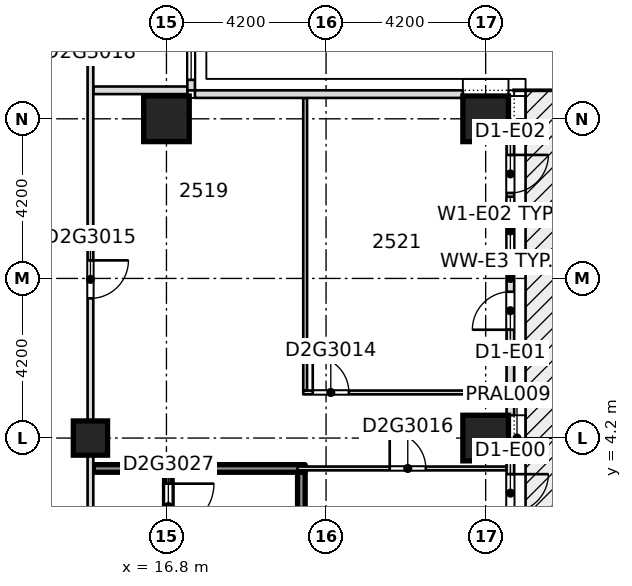
"""IFC4 building model, lengths in metres.
Left out: names, types, materials, properties, quantities, classifications, styles, units other than length and angle.
Written with IfcOpenShell. Run it as: python <this file> out.ifc"""

import sys

from ifc_helpers import new_model, si_unit, direction, frame, frame_2d, origin, origin_2d, place, context, subcontext, project, spatial, rectangle, extrude, element, fill, save


model = new_model("IFC4")
c1 = context("Model", 3, precision=1e-05, world=origin(), true_north=direction((0.0, 1.0)))
c2 = subcontext(c1, "Body", "Model", "MODEL_VIEW")
j1 = project(units=[si_unit("LENGTHUNIT", "METRE"), si_unit("PLANEANGLEUNIT", "RADIAN")], contexts=[c1])
p1 = place(None, origin())
s1 = spatial("IfcSite", under=j1, at=p1, CompositionType="ELEMENT")
p2 = place(p1, origin())
s2 = spatial("IfcBuilding", under=s1, at=p2, CompositionType="ELEMENT")
p3 = place(p2, frame((0.0, 0.0, 101.1)))
s3 = spatial("IfcBuildingStorey", under=s2, at=p3, CompositionType="ELEMENT", Elevation=101.1)
for number, where, z_axis, x_axis in (
    (1, (25.2, 4.2, -0.32), (0.0, 0.0, 1.0), (1.0, 0.0, 0.0)),
    (2, (16.8, 12.6, -0.32), (0.0, 0.0, 1.0), (1.0, 0.0, 0.0)),
    (3, (25.2, 12.6, -0.32), (0.0, 0.0, 1.0), (1.0, 0.0, 0.0)),
):
    element("IfcColumn", number, at=place(p3, frame(where, z_axis=z_axis, x_axis=x_axis)), inside=s3, PredefinedType="COLUMN", context=c2, shape_type="SweptSolid", body=[
        extrude(rectangle(XDim=1.2, YDim=1.2, at=origin_2d()), origin(), (0.0, 0.0, 1.0), 3.45),
    ])
p4 = place(p3, frame((14.8, 4.2, -0.32), z_axis=(0.0, 0.0, 1.0), x_axis=(1.0, 0.0, 0.0)))
e4 = element("IfcColumn", 4, at=p4, inside=s3, PredefinedType="COLUMN", context=c2, shape_type="SweptSolid", body=[
    extrude(rectangle(XDim=0.9, YDim=0.9, at=origin_2d()), origin(), (0.0, 0.0, 1.0), 3.45),
])
p5 = place(p3, frame((14.875, 3.4, 0.0), z_axis=(0.0, 0.0, 1.0), x_axis=(1.0, 0.0, 0.0)))
e5 = element("IfcWall", 5, at=p5, inside=s3, PredefinedType="SOLIDWALL", context=c2, shape_type="SweptSolid", body=[
    extrude(rectangle(XDim=5.575, YDim=0.2, at=frame_2d((2.788, 0.0))), origin(), (0.0, 0.0, 1.0), 3.13),
])
p6 = place(p3, frame((20.25, 3.4, 0.0), z_axis=(0.0, 0.0, 1.0), x_axis=(1.0, 0.0, 0.0)))
e6 = element("IfcWall", 6, at=p6, inside=s3, PredefinedType="PARTITIONING", context=c2, shape_type="SweptSolid", body=[
    extrude(rectangle(XDim=5.5, YDim=0.1, at=frame_2d((2.75, 0.0))), origin(), (0.0, 0.0, 1.0), 3.13),
])
p7 = place(p6, frame((2.425, 0.0, 0.0)))
e7 = element("IfcOpeningElement", 7, at=p7, cuts=e6, PredefinedType="OPENING", context=c2, shape_type="SweptSolid", body=[
    extrude(rectangle(XDim=0.95, YDim=2.1, at=frame_2d((0.475, 1.05))), frame((0.0, 0.06, 0.0), z_axis=(0.0, -1.0, 0.0), x_axis=(1.0, 0.0, 0.0)), (0.0, 0.0, 1.0), 0.12),
])
p8 = place(p3, frame((20.4, 5.4, 0.0), z_axis=(0.0, 0.0, 1.0), x_axis=(1.0, 0.0, 0.0)))
e8 = element("IfcWall", 8, at=p8, inside=s3, PredefinedType="PARTITIONING", context=c2, shape_type="SweptSolid", body=[
    extrude(rectangle(XDim=5.35, YDim=0.1, at=frame_2d((2.675, 0.0))), origin(), (0.0, 0.0, 1.0), 3.13),
])
p9 = place(p8, frame((0.25, 0.0, 0.0)))
e9 = element("IfcOpeningElement", 9, at=p9, cuts=e8, PredefinedType="OPENING", context=c2, shape_type="SweptSolid", body=[
    extrude(rectangle(XDim=0.95, YDim=2.1, at=frame_2d((0.475, 1.05))), frame((0.0, 0.06, 0.0), z_axis=(0.0, -1.0, 0.0), x_axis=(1.0, 0.0, 0.0)), (0.0, 0.0, 1.0), 0.12),
])
p10 = place(p3, frame((14.875, 13.35, 0.0), z_axis=(0.0, 0.0, 1.0), x_axis=(1.0, 0.0, 0.0)))
e10 = element("IfcWall", 10, at=p10, inside=s3, PredefinedType="PARTITIONING", context=c2, shape_type="SweptSolid", body=[
    extrude(rectangle(XDim=2.475, YDim=0.2, at=frame_2d((1.238, 0.0))), origin(), (0.0, 0.0, 1.0), 3.13),
])
p11 = place(p3, frame((14.8, -10.6, 0.0), z_axis=(0.0, 0.0, 1.0), x_axis=(0.0, 1.0, 0.0)))
e11 = element("IfcWall", 11, at=p11, inside=s3, PredefinedType="PARTITIONING", context=c2, shape_type="SweptSolid", body=[
    extrude(rectangle(XDim=32.15, YDim=0.15, at=frame_2d((16.075, 0.0))), origin(), (0.0, 0.0, 1.0), 3.13),
])
p12 = place(p11, frame((1.05, 0.0, 0.0)))
e12 = element("IfcOpeningElement", 12, at=p12, cuts=e11, PredefinedType="OPENING", context=c2, shape_type="SweptSolid", body=[
    extrude(rectangle(XDim=0.95, YDim=2.1, at=frame_2d((0.475, 1.05))), frame((0.0, 0.085, 0.0), z_axis=(0.0, -1.0, 0.0), x_axis=(1.0, 0.0, 0.0)), (0.0, 0.0, 1.0), 0.17),
])
p13 = place(p11, frame((18.475, 0.0, 0.0)))
e13 = element("IfcOpeningElement", 13, at=p13, cuts=e11, PredefinedType="OPENING", context=c2, shape_type="SweptSolid", body=[
    extrude(rectangle(XDim=1.0, YDim=2.1, at=frame_2d((0.5, 1.05))), frame((0.0, 0.085, 0.0), z_axis=(0.0, -1.0, 0.0), x_axis=(1.0, 0.0, 0.0)), (0.0, 0.0, 1.0), 0.17),
])
p14 = place(p11, frame((25.55, 0.0, 0.0)))
e14 = element("IfcOpeningElement", 14, at=p14, cuts=e11, PredefinedType="OPENING", context=c2, shape_type="SweptSolid", body=[
    extrude(rectangle(XDim=0.95, YDim=2.1, at=frame_2d((0.475, 1.05))), frame((0.0, 0.085, 0.0), z_axis=(0.0, -1.0, 0.0), x_axis=(1.0, 0.0, 0.0)), (0.0, 0.0, 1.0), 0.17),
])
p15 = place(p11, frame((29.45, 0.0, 0.0)))
e15 = element("IfcOpeningElement", 15, at=p15, cuts=e11, PredefinedType="OPENING", context=c2, shape_type="SweptSolid", body=[
    extrude(rectangle(XDim=0.95, YDim=2.1, at=frame_2d((0.475, 1.05))), frame((0.0, 0.085, 0.0), z_axis=(0.0, -1.0, 0.0), x_axis=(1.0, 0.0, 0.0)), (0.0, 0.0, 1.0), 0.17),
])
p16 = place(p11, frame((10.05, 0.0, 0.0)))
e16 = element("IfcOpeningElement", 16, at=p16, cuts=e11, PredefinedType="OPENING", context=c2, shape_type="SweptSolid", body=[
    extrude(rectangle(XDim=1.1, YDim=2.1, at=frame_2d((0.55, 1.05))), frame((0.0, 0.085, 0.0), z_axis=(0.0, -1.0, 0.0), x_axis=(1.0, 0.0, 0.0)), (0.0, 0.0, 1.0), 0.17),
])
p17 = place(p11, frame((4.85, 0.0, 0.0)))
e17 = element("IfcOpeningElement", 17, at=p17, cuts=e11, PredefinedType="OPENING", context=c2, shape_type="SweptSolid", body=[
    extrude(rectangle(XDim=1.0, YDim=2.1, at=frame_2d((0.5, 1.05))), frame((0.0, 0.085, 0.0), z_axis=(0.0, -1.0, 0.0), x_axis=(1.0, 0.0, 0.0)), (0.0, 0.0, 1.0), 0.17),
])
p18 = place(p3, frame((16.85, -3.3, 0.0), z_axis=(0.0, 0.0, 1.0), x_axis=(0.0, 1.0, 0.0)))
e18 = element("IfcWall", 18, at=p18, inside=s3, PredefinedType="SOLIDWALL", context=c2, shape_type="SweptSolid", body=[
    extrude(rectangle(XDim=6.6, YDim=0.2, at=frame_2d((3.3, 0.0))), origin(), (0.0, 0.0, 1.0), 3.13),
])
p19 = place(p18, frame((5.1, 0.0, 0.0)))
e19 = element("IfcOpeningElement", 19, at=p19, cuts=e18, PredefinedType="OPENING", context=c2, shape_type="SweptSolid", body=[
    extrude(rectangle(XDim=1.2, YDim=2.1, at=frame_2d((0.6, 1.05))), frame((0.0, 0.11, 0.0), z_axis=(0.0, -1.0, 0.0), x_axis=(1.0, 0.0, 0.0)), (0.0, 0.0, 1.0), 0.22),
])
p20 = place(p3, frame((20.35, -0.83, 0.0), z_axis=(0.0, 0.0, 1.0), x_axis=(0.0, 1.0, 0.0)))
e20 = element("IfcWall", 20, at=p20, inside=s3, PredefinedType="SOLIDWALL", context=c2, shape_type="SweptSolid", body=[
    extrude(rectangle(XDim=4.13, YDim=0.2, at=frame_2d((2.065, 0.0))), origin(), (0.0, 0.0, 1.0), 3.13),
])
p21 = place(p3, frame((20.45, 5.45, 0.0), z_axis=(0.0, 0.0, 1.0), x_axis=(0.0, 1.0, 0.0)))
e21 = element("IfcWall", 21, at=p21, inside=s3, PredefinedType="PARTITIONING", context=c2, shape_type="SweptSolid", body=[
    extrude(rectangle(XDim=7.7, YDim=0.1, at=frame_2d((3.85, 0.0))), origin(), (0.0, 0.0, 1.0), 3.13),
])
p22 = place(p3, frame((25.85, -3.6, 0.0), z_axis=(0.0, 0.0, 1.0), x_axis=(0.0, 1.0, 0.0)))
e22 = element("IfcWall", 22, at=p22, inside=s3, PredefinedType="STANDARD", context=c2, shape_type="SweptSolid", body=[
    extrude(rectangle(XDim=7.2, YDim=0.2, at=frame_2d((3.6, 0.0))), origin(), (0.0, 0.0, 1.0), 3.13),
])
p23 = place(p22, frame((0.35, 0.0, 0.2)))
e23 = element("IfcOpeningElement", 23, at=p23, cuts=e22, PredefinedType="OPENING", context=c2, shape_type="SweptSolid", body=[
    extrude(rectangle(XDim=1.8, YDim=2.65, at=frame_2d((0.9, 1.325))), frame((0.0, 0.11, 0.0), z_axis=(0.0, -1.0, 0.0), x_axis=(1.0, 0.0, 0.0)), (0.0, 0.0, 1.0), 0.22),
])
p24 = place(p22, frame((2.25, 0.0, 0.0)))
e24 = element("IfcOpeningElement", 24, at=p24, cuts=e22, PredefinedType="OPENING", context=c2, shape_type="SweptSolid", body=[
    extrude(rectangle(XDim=1.0, YDim=2.4, at=frame_2d((0.5, 1.2))), frame((0.0, 0.11, 0.0), z_axis=(0.0, -1.0, 0.0), x_axis=(1.0, 0.0, 0.0)), (0.0, 0.0, 1.0), 0.22),
])
p25 = place(p22, frame((3.95, 0.0, 0.2)))
e25 = element("IfcOpeningElement", 25, at=p25, cuts=e22, PredefinedType="OPENING", context=c2, shape_type="SweptSolid", body=[
    extrude(rectangle(XDim=1.8, YDim=2.65, at=frame_2d((0.9, 1.325))), frame((0.0, 0.11, 0.0), z_axis=(0.0, -1.0, 0.0), x_axis=(1.0, 0.0, 0.0)), (0.0, 0.0, 1.0), 0.22),
])
p26 = place(p22, frame((5.85, 0.0, 0.0)))
e26 = element("IfcOpeningElement", 26, at=p26, cuts=e22, PredefinedType="OPENING", context=c2, shape_type="SweptSolid", body=[
    extrude(rectangle(XDim=1.0, YDim=2.4, at=frame_2d((0.5, 1.2))), frame((0.0, 0.11, 0.0), z_axis=(0.0, -1.0, 0.0), x_axis=(1.0, 0.0, 0.0)), (0.0, 0.0, 1.0), 0.22),
])
p27 = place(p3, frame((25.85, 4.8, 0.0), z_axis=(0.0, 0.0, 1.0), x_axis=(0.0, 1.0, 0.0)))
e27 = element("IfcWall", 27, at=p27, inside=s3, PredefinedType="STANDARD", context=c2, shape_type="SweptSolid", body=[
    extrude(rectangle(XDim=7.2, YDim=0.2, at=frame_2d((3.6, 0.0))), origin(), (0.0, 0.0, 1.0), 3.13),
])
p28 = place(p27, frame((2.25, 0.0, 0.0)))
e28 = element("IfcOpeningElement", 28, at=p28, cuts=e27, PredefinedType="OPENING", context=c2, shape_type="SweptSolid", body=[
    extrude(rectangle(XDim=1.0, YDim=2.4, at=frame_2d((0.5, 1.2))), frame((0.0, 0.11, 0.0), z_axis=(0.0, -1.0, 0.0), x_axis=(1.0, 0.0, 0.0)), (0.0, 0.0, 1.0), 0.22),
])
p29 = place(p27, frame((3.95, 0.0, 0.2)))
e29 = element("IfcOpeningElement", 29, at=p29, cuts=e27, PredefinedType="OPENING", context=c2, shape_type="SweptSolid", body=[
    extrude(rectangle(XDim=1.8, YDim=2.65, at=frame_2d((0.9, 1.325))), frame((0.0, 0.11, 0.0), z_axis=(0.0, -1.0, 0.0), x_axis=(1.0, 0.0, 0.0)), (0.0, 0.0, 1.0), 0.22),
])
p30 = place(p27, frame((5.85, 0.0, 0.0)))
e30 = element("IfcOpeningElement", 30, at=p30, cuts=e27, PredefinedType="OPENING", context=c2, shape_type="SweptSolid", body=[
    extrude(rectangle(XDim=1.0, YDim=2.4, at=frame_2d((0.5, 1.2))), frame((0.0, 0.11, 0.0), z_axis=(0.0, -1.0, 0.0), x_axis=(1.0, 0.0, 0.0)), (0.0, 0.0, 1.0), 0.22),
])
p31 = place(p3, frame((24.6, 13.25, 0.0), z_axis=(0.0, 0.0, 1.0), x_axis=(-1.0, 0.0, 0.0)))
e31 = element("IfcWall", 31, at=p31, inside=s3, PredefinedType="STANDARD", context=c2, shape_type="SweptSolid", body=[
    extrude(rectangle(XDim=7.05, YDim=0.2, at=frame_2d((3.525, 0.0))), origin(), (0.0, 0.0, 1.0), 3.13),
])
p32 = place(p3, frame((17.45, 13.35, 0.0), z_axis=(0.0, 0.0, 1.0), x_axis=(0.0, 1.0, 0.0)))
e32 = element("IfcWall", 32, at=p32, inside=s3, PredefinedType="STANDARD", context=c2, shape_type="SweptSolid", body=[
    extrude(rectangle(XDim=7.05, YDim=0.2, at=frame_2d((3.525, 0.0))), origin(), (0.0, 0.0, 1.0), 3.13),
])
p33 = place(p32, frame((0.275, 0.0, 0.2)))
e33 = element("IfcOpeningElement", 33, at=p33, cuts=e32, PredefinedType="OPENING", context=c2, shape_type="SweptSolid", body=[
    extrude(rectangle(XDim=1.8, YDim=2.65, at=frame_2d((0.9, 1.325))), frame((0.0, 0.11, 0.0), z_axis=(0.0, -1.0, 0.0), x_axis=(1.0, 0.0, 0.0)), (0.0, 0.0, 1.0), 0.22),
])
p34 = place(p32, frame((4.37, 0.0, 0.2)))
e34 = element("IfcOpeningElement", 34, at=p34, cuts=e32, PredefinedType="OPENING", context=c2, shape_type="SweptSolid", body=[
    extrude(rectangle(XDim=1.8, YDim=2.65, at=frame_2d((0.9, 1.325))), frame((0.0, 0.11, 0.0), z_axis=(0.0, -1.0, 0.0), x_axis=(1.0, 0.0, 0.0)), (0.0, 0.0, 1.0), 0.22),
])
p35 = place(p9, origin())
e35 = element("IfcDoor", 35, at=p35, inside=s3, OperationType="SINGLE_SWING_LEFT", PredefinedType="DOOR", context=c2, shape_type="SweptSolid", body=[
    extrude(rectangle(XDim=0.95, YDim=2.1, at=frame_2d((0.475, 1.05))), frame((0.0, 0.025, 0.0), z_axis=(0.0, -1.0, 0.0), x_axis=(1.0, 0.0, 0.0)), (0.0, 0.0, 1.0), 0.05),
])
fill(e9, e35)
p36 = place(p13, origin())
e36 = element("IfcDoor", 36, at=p36, inside=s3, OperationType="SINGLE_SWING_LEFT", PredefinedType="DOOR", context=c2, shape_type="SweptSolid", body=[
    extrude(rectangle(XDim=1.0, YDim=2.1, at=frame_2d((0.5, 1.05))), frame((0.0, 0.025, 0.0), z_axis=(0.0, -1.0, 0.0), x_axis=(1.0, 0.0, 0.0)), (0.0, 0.0, 1.0), 0.05),
])
fill(e13, e36)
p37 = place(p7, origin())
e37 = element("IfcDoor", 37, at=p37, inside=s3, OperationType="SINGLE_SWING_LEFT", PredefinedType="DOOR", context=c2, shape_type="SweptSolid", body=[
    extrude(rectangle(XDim=0.95, YDim=2.1, at=frame_2d((0.475, 1.05))), frame((0.0, 0.025, 0.0), z_axis=(0.0, -1.0, 0.0), x_axis=(1.0, 0.0, 0.0)), (0.0, 0.0, 1.0), 0.05),
])
fill(e7, e37)
p38 = place(p19, origin())
e38 = element("IfcDoor", 38, at=p38, inside=s3, OperationType="SINGLE_SWING_LEFT", PredefinedType="DOOR", context=c2, shape_type="SweptSolid", body=[
    extrude(rectangle(XDim=1.2, YDim=2.1, at=frame_2d((0.6, 1.05))), frame((0.0, 0.025, 0.0), z_axis=(0.0, -1.0, 0.0), x_axis=(1.0, 0.0, 0.0)), (0.0, 0.0, 1.0), 0.05),
])
fill(e19, e38)
p39 = place(p26, origin())
e39 = element("IfcDoor", 39, at=p39, inside=s3, OperationType="SINGLE_SWING_LEFT", PredefinedType="DOOR", context=c2, shape_type="SweptSolid", body=[
    extrude(rectangle(XDim=1.0, YDim=2.4, at=frame_2d((0.5, 1.2))), frame((0.0, 0.025, 0.0), z_axis=(0.0, -1.0, 0.0), x_axis=(1.0, 0.0, 0.0)), (0.0, 0.0, 1.0), 0.05),
])
fill(e26, e39)
p40 = place(p28, origin())
e40 = element("IfcDoor", 40, at=p40, inside=s3, OperationType="SINGLE_SWING_LEFT", PredefinedType="DOOR", context=c2, shape_type="SweptSolid", body=[
    extrude(rectangle(XDim=1.0, YDim=2.4, at=frame_2d((0.5, 1.2))), frame((0.0, 0.025, 0.0), z_axis=(0.0, -1.0, 0.0), x_axis=(1.0, 0.0, 0.0)), (0.0, 0.0, 1.0), 0.05),
])
fill(e28, e40)
p41 = place(p29, origin())
e41 = element("IfcWindow", 41, at=p41, inside=s3, PartitioningType="SINGLE_PANEL", PredefinedType="WINDOW", context=c2, shape_type="SweptSolid", body=[
    extrude(rectangle(XDim=1.8, YDim=2.65, at=frame_2d((0.9, 1.325))), frame((0.0, 0.03, 0.0), z_axis=(0.0, -1.0, 0.0), x_axis=(1.0, 0.0, 0.0)), (0.0, 0.0, 1.0), 0.06),
])
fill(e29, e41)
p42 = place(p30, origin())
e42 = element("IfcDoor", 42, at=p42, inside=s3, OperationType="SINGLE_SWING_LEFT", PredefinedType="DOOR", context=c2, shape_type="SweptSolid", body=[
    extrude(rectangle(XDim=1.0, YDim=2.4, at=frame_2d((0.5, 1.2))), frame((0.0, 0.025, 0.0), z_axis=(0.0, -1.0, 0.0), x_axis=(1.0, 0.0, 0.0)), (0.0, 0.0, 1.0), 0.05),
])
fill(e30, e42)
p43 = place(p33, origin())
e43 = element("IfcWindow", 43, at=p43, inside=s3, PartitioningType="SINGLE_PANEL", PredefinedType="WINDOW", context=c2, shape_type="SweptSolid", body=[
    extrude(rectangle(XDim=1.8, YDim=2.65, at=frame_2d((0.9, 1.325))), frame((0.0, 0.03, 0.0), z_axis=(0.0, -1.0, 0.0), x_axis=(1.0, 0.0, 0.0)), (0.0, 0.0, 1.0), 0.06),
])
fill(e33, e43)
save(model, sys.argv[1])
